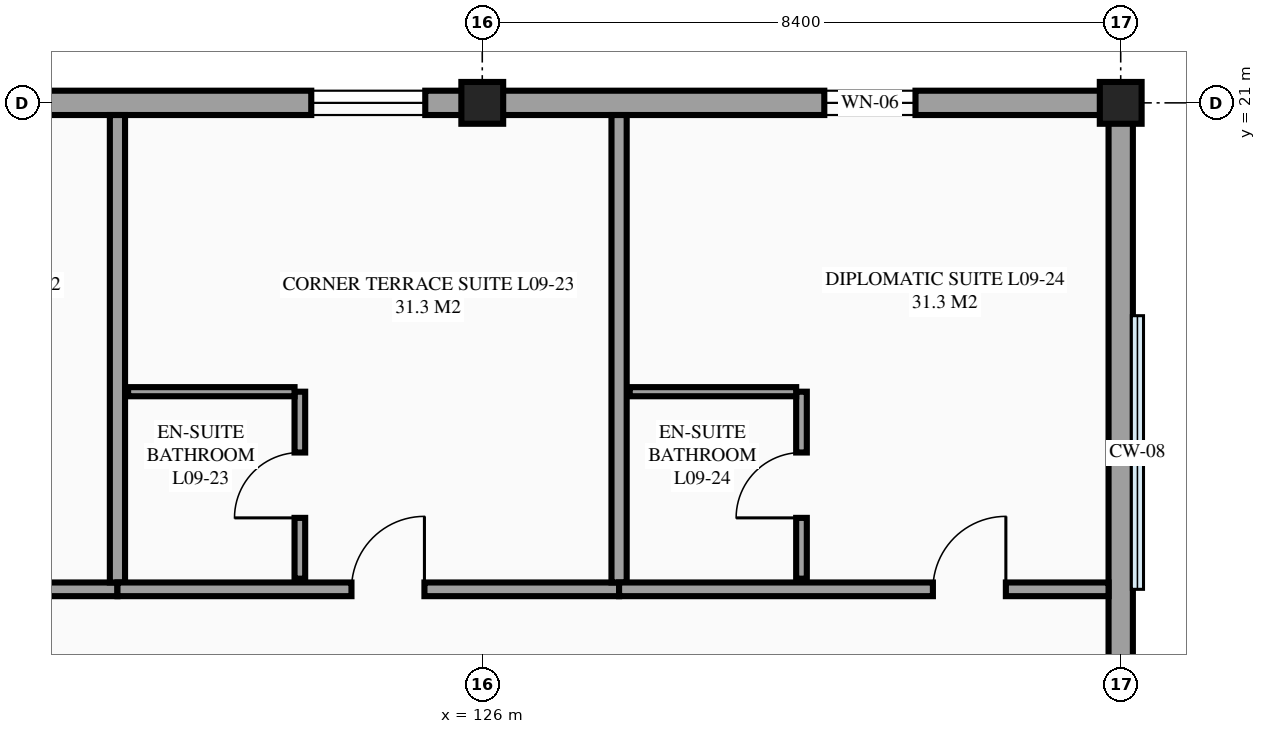
"""IFC4 building model, lengths in metres.
Left out: names, types, materials, properties, quantities, classifications, styles, units other than length and angle.
Written with IfcOpenShell. Run it as: python <this file> out.ifc"""

import sys

from ifc_helpers import new_model, si_unit, direction, frame, frame_2d, origin, origin_2d, place, context, subcontext, project, spatial, rectangle, extrude, element, fill, save


model = new_model("IFC4")
c1 = context("Model", 3, precision=1e-05, world=origin(), true_north=direction((0.0, 1.0)))
c2 = subcontext(c1, "Body", "Model", "MODEL_VIEW")
j1 = project(units=[si_unit("LENGTHUNIT", "METRE"), si_unit("PLANEANGLEUNIT", "RADIAN")], contexts=[c1])
p1 = place(None, origin())
s1 = spatial("IfcSite", under=j1, at=p1, CompositionType="ELEMENT")
p2 = place(p1, origin())
s2 = spatial("IfcBuilding", under=s1, at=p2, CompositionType="ELEMENT")
p3 = place(p2, frame((0.0, 0.0, 36.3)))
s3 = spatial("IfcBuildingStorey", under=s2, at=p3, CompositionType="ELEMENT", Elevation=36.3)
for number, where, z_axis, x_axis in (
    (1, (126.0, 21.0, 0.0), (0.0, 0.0, 1.0), (1.0, 0.0, 0.0)),
    (2, (134.4, 21.0, 0.0), (0.0, 0.0, 1.0), (1.0, 0.0, 0.0)),
):
    element("IfcColumn", number, at=place(p3, frame(where, z_axis=z_axis, x_axis=x_axis)), inside=s3, PredefinedType="COLUMN", context=c2, shape_type="SweptSolid", body=[
        extrude(rectangle(XDim=0.55, YDim=0.55, at=origin_2d()), origin(), (0.0, 0.0, 1.0), 3.6),
    ])
p4 = place(p3, frame((134.4, 4.2, 0.0), z_axis=(0.0, 0.0, 1.0), x_axis=(0.0, 1.0, 0.0)))
e3 = element("IfcWall", 3, at=p4, inside=s3, PredefinedType="STANDARD", context=c2, shape_type="SweptSolid", body=[
    extrude(rectangle(XDim=16.8, YDim=0.32, at=frame_2d((8.4, 0.0))), origin(), (0.0, 0.0, 1.0), 2.53),
])
p5 = place(p3, frame((134.4, 21.0, 0.0), z_axis=(0.0, 0.0, 1.0), x_axis=(-1.0, 0.0, 0.0)))
e4 = element("IfcWall", 4, at=p5, inside=s3, PredefinedType="STANDARD", context=c2, shape_type="SweptSolid", body=[
    extrude(rectangle(XDim=16.8, YDim=0.32, at=frame_2d((8.4, 0.0))), origin(), (0.0, 0.0, 1.0), 2.53),
])
p6 = place(p5, frame((14.5, 0.0, 0.85)))
e5 = element("IfcOpeningElement", 5, at=p6, cuts=e4, PredefinedType="OPENING", context=c2, shape_type="SweptSolid", body=[
    extrude(rectangle(XDim=1.5, YDim=1.5, at=frame_2d((0.75, 0.75))), frame((0.0, 0.17, 0.0), z_axis=(0.0, -1.0, 0.0), x_axis=(1.0, 0.0, 0.0)), (0.0, 0.0, 1.0), 0.34),
])
p7 = place(p5, frame((9.15, 0.0, 0.85)))
e6 = element("IfcOpeningElement", 6, at=p7, cuts=e4, PredefinedType="OPENING", context=c2, shape_type="SweptSolid", body=[
    extrude(rectangle(XDim=1.5, YDim=1.5, at=frame_2d((0.75, 0.75))), frame((0.0, 0.17, 0.0), z_axis=(0.0, -1.0, 0.0), x_axis=(1.0, 0.0, 0.0)), (0.0, 0.0, 1.0), 0.34),
])
p8 = place(p5, frame((2.7, 0.0, 0.85)))
e7 = element("IfcOpeningElement", 7, at=p8, cuts=e4, PredefinedType="OPENING", context=c2, shape_type="SweptSolid", body=[
    extrude(rectangle(XDim=1.2, YDim=1.5, at=frame_2d((0.6, 0.75))), frame((0.0, 0.17, 0.0), z_axis=(0.0, -1.0, 0.0), x_axis=(1.0, 0.0, 0.0)), (0.0, 0.0, 1.0), 0.34),
])
p9 = place(p3, frame((114.6, 14.6, 0.0), z_axis=(0.0, 0.0, 1.0), x_axis=(1.0, 0.0, 0.0)))
e8 = element("IfcWall", 8, at=p9, inside=s3, PredefinedType="PARTITIONING", context=c2, shape_type="SweptSolid", body=[
    extrude(rectangle(XDim=6.6, YDim=0.18, at=frame_2d((3.3, 0.0))), origin(), (0.0, 0.0, 1.0), 3.375),
])
p10 = place(p9, frame((4.479, 0.0, 0.0)))
e9 = element("IfcOpeningElement", 9, at=p10, cuts=e8, PredefinedType="OPENING", context=c2, shape_type="SweptSolid", body=[
    extrude(rectangle(XDim=0.96, YDim=2.15, at=frame_2d((0.48, 1.075))), frame((0.0, 0.1, 0.0), z_axis=(0.0, -1.0, 0.0), x_axis=(1.0, 0.0, 0.0)), (0.0, 0.0, 1.0), 0.2),
])
p11 = place(p3, frame((121.2, 14.69, 0.0), z_axis=(0.0, 0.0, 1.0), x_axis=(0.0, 1.0, 0.0)))
e10 = element("IfcWall", 10, at=p11, inside=s3, PredefinedType="PARTITIONING", context=c2, shape_type="SweptSolid", body=[
    extrude(rectangle(XDim=6.15, YDim=0.2, at=frame_2d((3.075, 0.0))), origin(), (0.0, 0.0, 1.0), 3.375),
])
p12 = place(p3, frame((121.2, 14.6, 0.0), z_axis=(0.0, 0.0, 1.0), x_axis=(1.0, 0.0, 0.0)))
e11 = element("IfcWall", 11, at=p12, inside=s3, PredefinedType="PARTITIONING", context=c2, shape_type="SweptSolid", body=[
    extrude(rectangle(XDim=6.6, YDim=0.18, at=frame_2d((3.3, 0.0))), origin(), (0.0, 0.0, 1.0), 3.375),
])
p13 = place(p12, frame((3.079, 0.0, 0.0)))
e12 = element("IfcOpeningElement", 12, at=p13, cuts=e11, PredefinedType="OPENING", context=c2, shape_type="SweptSolid", body=[
    extrude(rectangle(XDim=0.96, YDim=2.15, at=frame_2d((0.48, 1.075))), frame((0.0, 0.1, 0.0), z_axis=(0.0, -1.0, 0.0), x_axis=(1.0, 0.0, 0.0)), (0.0, 0.0, 1.0), 0.2),
])
p14 = place(p3, frame((127.8, 14.69, 0.0), z_axis=(0.0, 0.0, 1.0), x_axis=(0.0, 1.0, 0.0)))
e13 = element("IfcWall", 13, at=p14, inside=s3, PredefinedType="PARTITIONING", context=c2, shape_type="SweptSolid", body=[
    extrude(rectangle(XDim=6.15, YDim=0.2, at=frame_2d((3.075, 0.0))), origin(), (0.0, 0.0, 1.0), 3.375),
])
p15 = place(p3, frame((123.6, 14.74, 0.0), z_axis=(0.0, 0.0, 1.0), x_axis=(0.0, 1.0, 0.0)))
e14 = element("IfcWall", 14, at=p15, inside=s3, PredefinedType="PARTITIONING", context=c2, shape_type="SweptSolid", body=[
    extrude(rectangle(XDim=2.46, YDim=0.14, at=frame_2d((1.23, 0.0))), origin(), (0.0, 0.0, 1.0), 3.375),
])
p16 = place(p15, frame((0.8, 0.0, 0.0)))
e15 = element("IfcOpeningElement", 15, at=p16, cuts=e14, PredefinedType="OPENING", context=c2, shape_type="SweptSolid", body=[
    extrude(rectangle(XDim=0.86, YDim=2.1, at=frame_2d((0.43, 1.05))), frame((0.0, 0.08, 0.0), z_axis=(0.0, -1.0, 0.0), x_axis=(1.0, 0.0, 0.0)), (0.0, 0.0, 1.0), 0.16),
])
p17 = place(p3, frame((121.34, 17.2, 0.0), z_axis=(0.0, 0.0, 1.0), x_axis=(1.0, 0.0, 0.0)))
e16 = element("IfcWall", 16, at=p17, inside=s3, PredefinedType="PARTITIONING", context=c2, shape_type="SweptSolid", body=[
    extrude(rectangle(XDim=2.19, YDim=0.12, at=frame_2d((1.095, 0.0))), origin(), (0.0, 0.0, 1.0), 3.375),
])
p18 = place(p3, frame((127.8, 14.6, 0.0), z_axis=(0.0, 0.0, 1.0), x_axis=(1.0, 0.0, 0.0)))
e17 = element("IfcWall", 17, at=p18, inside=s3, PredefinedType="PARTITIONING", context=c2, shape_type="SweptSolid", body=[
    extrude(rectangle(XDim=6.44, YDim=0.18, at=frame_2d((3.22, 0.0))), origin(), (0.0, 0.0, 1.0), 3.375),
])
p19 = place(p18, frame((4.129, 0.0, 0.0)))
e18 = element("IfcOpeningElement", 18, at=p19, cuts=e17, PredefinedType="OPENING", context=c2, shape_type="SweptSolid", body=[
    extrude(rectangle(XDim=0.96, YDim=2.15, at=frame_2d((0.48, 1.075))), frame((0.0, 0.1, 0.0), z_axis=(0.0, -1.0, 0.0), x_axis=(1.0, 0.0, 0.0)), (0.0, 0.0, 1.0), 0.2),
])
p20 = place(p3, frame((130.2, 14.74, 0.0), z_axis=(0.0, 0.0, 1.0), x_axis=(0.0, 1.0, 0.0)))
e19 = element("IfcWall", 19, at=p20, inside=s3, PredefinedType="PARTITIONING", context=c2, shape_type="SweptSolid", body=[
    extrude(rectangle(XDim=2.46, YDim=0.14, at=frame_2d((1.23, 0.0))), origin(), (0.0, 0.0, 1.0), 3.375),
])
p21 = place(p20, frame((0.8, 0.0, 0.0)))
e20 = element("IfcOpeningElement", 20, at=p21, cuts=e19, PredefinedType="OPENING", context=c2, shape_type="SweptSolid", body=[
    extrude(rectangle(XDim=0.86, YDim=2.1, at=frame_2d((0.43, 1.05))), frame((0.0, 0.08, 0.0), z_axis=(0.0, -1.0, 0.0), x_axis=(1.0, 0.0, 0.0)), (0.0, 0.0, 1.0), 0.16),
])
p22 = place(p3, frame((127.94, 17.2, 0.0), z_axis=(0.0, 0.0, 1.0), x_axis=(1.0, 0.0, 0.0)))
e21 = element("IfcWall", 21, at=p22, inside=s3, PredefinedType="PARTITIONING", context=c2, shape_type="SweptSolid", body=[
    extrude(rectangle(XDim=2.19, YDim=0.12, at=frame_2d((1.095, 0.0))), origin(), (0.0, 0.0, 1.0), 3.375),
])
p23 = place(p7, origin())
e22 = element("IfcWindow", 22, at=p23, inside=s3, PartitioningType="SINGLE_PANEL", PredefinedType="WINDOW", context=c2, shape_type="SweptSolid", body=[
    extrude(rectangle(XDim=1.5, YDim=1.5, at=frame_2d((0.75, 0.75))), frame((0.0, 0.03, 0.0), z_axis=(0.0, -1.0, 0.0), x_axis=(1.0, 0.0, 0.0)), (0.0, 0.0, 1.0), 0.06),
])
fill(e6, e22)
p24 = place(p8, origin())
e23 = element("IfcWindow", 23, at=p24, inside=s3, PartitioningType="SINGLE_PANEL", PredefinedType="WINDOW", context=c2, shape_type="SweptSolid", body=[
    extrude(rectangle(XDim=1.2, YDim=1.5, at=frame_2d((0.6, 0.75))), frame((0.0, 0.03, 0.0), z_axis=(0.0, -1.0, 0.0), x_axis=(1.0, 0.0, 0.0)), (0.0, 0.0, 1.0), 0.06),
])
fill(e7, e23)
p25 = place(p13, origin())
e24 = element("IfcDoor", 24, at=p25, inside=s3, OperationType="SINGLE_SWING_RIGHT", PredefinedType="DOOR", context=c2, shape_type="SweptSolid", body=[
    extrude(rectangle(XDim=0.96, YDim=2.15, at=frame_2d((0.48, 1.075))), frame((0.0, 0.025, 0.0), z_axis=(0.0, -1.0, 0.0), x_axis=(1.0, 0.0, 0.0)), (0.0, 0.0, 1.0), 0.05),
])
fill(e12, e24)
p26 = place(p16, origin())
e25 = element("IfcDoor", 25, at=p26, inside=s3, OperationType="SINGLE_SWING_LEFT", PredefinedType="DOOR", context=c2, shape_type="SweptSolid", body=[
    extrude(rectangle(XDim=0.86, YDim=2.1, at=frame_2d((0.43, 1.05))), frame((0.0, 0.025, 0.0), z_axis=(0.0, -1.0, 0.0), x_axis=(1.0, 0.0, 0.0)), (0.0, 0.0, 1.0), 0.05),
])
fill(e15, e25)
p27 = place(p19, origin())
e26 = element("IfcDoor", 26, at=p27, inside=s3, OperationType="SINGLE_SWING_RIGHT", PredefinedType="DOOR", context=c2, shape_type="SweptSolid", body=[
    extrude(rectangle(XDim=0.96, YDim=2.15, at=frame_2d((0.48, 1.075))), frame((0.0, 0.025, 0.0), z_axis=(0.0, -1.0, 0.0), x_axis=(1.0, 0.0, 0.0)), (0.0, 0.0, 1.0), 0.05),
])
fill(e18, e26)
p28 = place(p21, origin())
e27 = element("IfcDoor", 27, at=p28, inside=s3, OperationType="SINGLE_SWING_LEFT", PredefinedType="DOOR", context=c2, shape_type="SweptSolid", body=[
    extrude(rectangle(XDim=0.86, YDim=2.1, at=frame_2d((0.43, 1.05))), frame((0.0, 0.025, 0.0), z_axis=(0.0, -1.0, 0.0), x_axis=(1.0, 0.0, 0.0)), (0.0, 0.0, 1.0), 0.05),
])
fill(e20, e27)
save(model, sys.argv[1])
